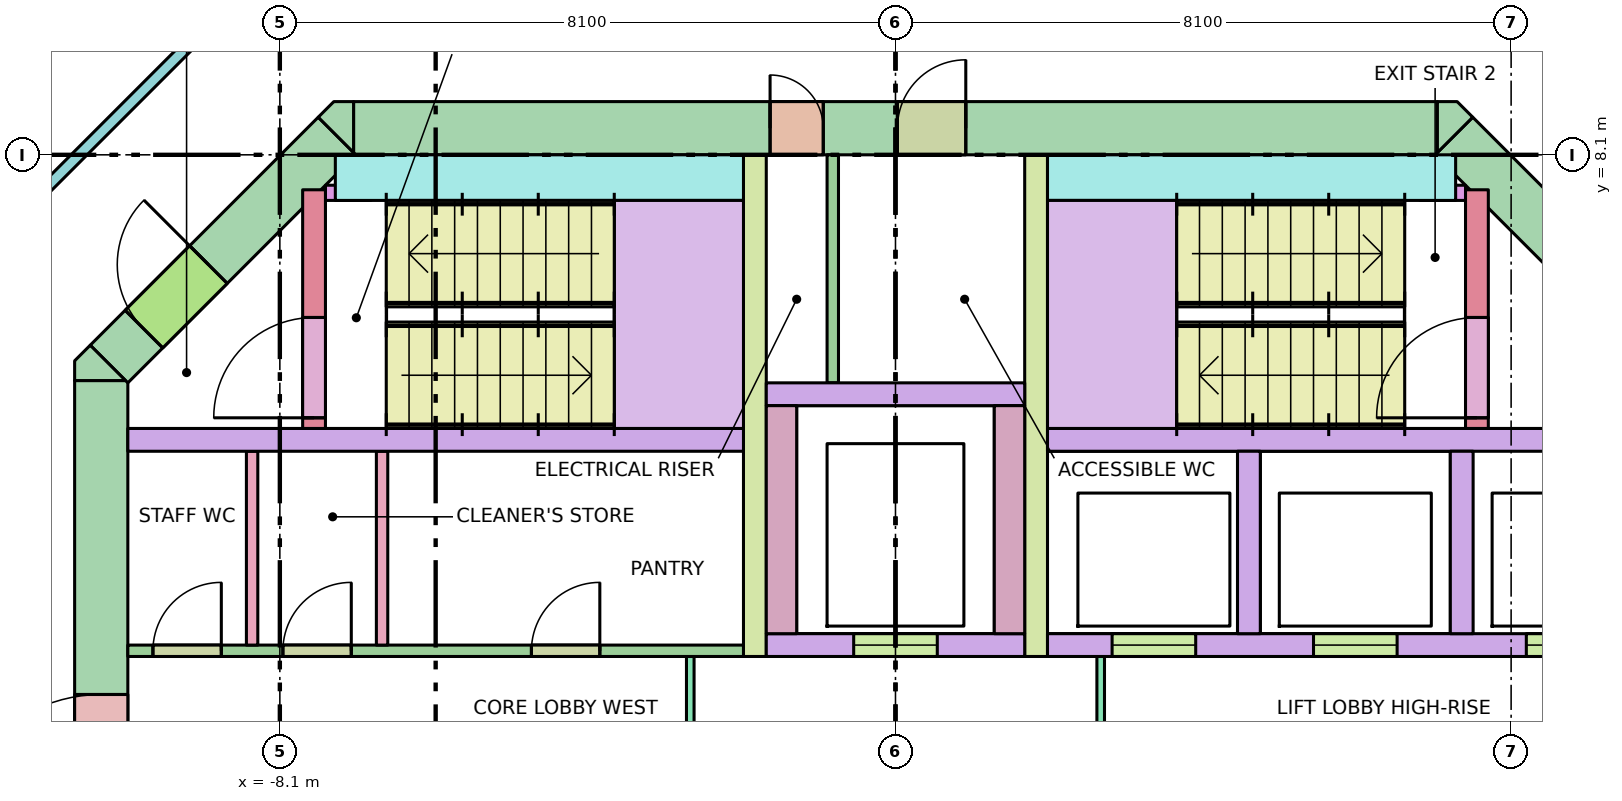
"""IFC4 building model, lengths in metres.
Left out: names, types, materials, properties, quantities, classifications, styles, units other than length and angle.
Written with IfcOpenShell. Run it as: python <this file> out.ifc"""

import sys

from ifc_helpers import new_model, si_unit, direction, frame, frame_2d, origin, place, context, subcontext, project, spatial, polyline, rectangle, outline, extrude, element, fill, save


model = new_model("IFC4")
c1 = context("Model", 3, precision=1e-05, world=origin(), true_north=direction((0.0, 1.0)))
c2 = subcontext(c1, "Body", "Model", "MODEL_VIEW")
j1 = project(units=[si_unit("LENGTHUNIT", "METRE"), si_unit("PLANEANGLEUNIT", "RADIAN")], contexts=[c1])
p1 = place(None, origin())
s1 = spatial("IfcSite", under=j1, at=p1, CompositionType="ELEMENT")
p2 = place(p1, origin())
s2 = spatial("IfcBuilding", under=s1, at=p2, CompositionType="ELEMENT")
p3 = place(p2, frame((0.0, 0.0, 165.3)))
s3 = spatial("IfcBuildingStorey", under=s2, at=p3, CompositionType="ELEMENT", Elevation=165.3)
p4 = place(p3, frame((-7.13, 8.45, -0.28), z_axis=(0.0, 0.0, 1.0), x_axis=(1.0, 0.0, 0.0)))
e1 = element("IfcWall", 1, at=p4, inside=s3, PredefinedType="SHEAR", context=c2, shape_type="SweptSolid", body=[
    extrude(rectangle(XDim=14.26, YDim=0.7, at=frame_2d((7.13, 0.0))), origin(), (0.0, 0.0, 1.0), 3.7),
])
p5 = place(p4, frame((5.48, 0.0, 0.28)))
e2 = element("IfcOpeningElement", 2, at=p5, cuts=e1, PredefinedType="OPENING", context=c2, shape_type="SweptSolid", body=[
    extrude(rectangle(XDim=0.7, YDim=2.1, at=frame_2d((0.35, 1.05))), frame((0.0, 0.36, 0.0), z_axis=(0.0, -1.0, 0.0), x_axis=(1.0, 0.0, 0.0)), (0.0, 0.0, 1.0), 0.72),
])
p6 = place(p4, frame((7.155, 0.0, 0.28)))
e3 = element("IfcOpeningElement", 3, at=p6, cuts=e1, PredefinedType="OPENING", context=c2, shape_type="SweptSolid", body=[
    extrude(rectangle(XDim=0.9, YDim=2.1, at=frame_2d((0.45, 1.05))), frame((0.0, 0.36, 0.0), z_axis=(0.0, -1.0, 0.0), x_axis=(1.0, 0.0, 0.0)), (0.0, 0.0, 1.0), 0.72),
])
p7 = place(p3, frame((-10.45, -5.13, -0.28), z_axis=(0.0, 0.0, 1.0), x_axis=(0.0, 1.0, 0.0)))
e4 = element("IfcWall", 4, at=p7, inside=s3, PredefinedType="SHEAR", context=c2, shape_type="SweptSolid", body=[
    extrude(rectangle(XDim=10.26, YDim=0.7, at=frame_2d((5.13, 0.0))), origin(), (0.0, 0.0, 1.0), 3.7),
])
p8 = place(p7, frame((4.13, 0.0, 0.28)))
e5 = element("IfcOpeningElement", 5, at=p8, cuts=e4, PredefinedType="OPENING", context=c2, shape_type="SweptSolid", body=[
    extrude(rectangle(XDim=2.0, YDim=2.1, at=frame_2d((1.0, 1.05))), frame((0.0, 0.36, 0.0), z_axis=(0.0, -1.0, 0.0), x_axis=(1.0, 0.0, 0.0)), (0.0, 0.0, 1.0), 0.72),
])
p9 = place(p3, frame((-10.347, 5.347, -0.28), z_axis=(0.0, 0.0, 1.0), x_axis=(0.707106781187, 0.707106781187, 0.0)))
e6 = element("IfcWall", 6, at=p9, inside=s3, PredefinedType="SHEAR", context=c2, shape_type="SweptSolid", body=[
    extrude(rectangle(XDim=4.243, YDim=0.7, at=frame_2d((2.121, 0.0))), origin(), (0.0, 0.0, 1.0), 3.7),
])
p10 = place(p9, frame((0.65, 0.0, 0.28)))
e7 = element("IfcOpeningElement", 7, at=p10, cuts=e6, PredefinedType="OPENING", context=c2, shape_type="SweptSolid", body=[
    extrude(rectangle(XDim=1.2, YDim=2.1, at=frame_2d((0.6, 1.05))), frame((0.0, 0.36, 0.0), z_axis=(0.0, -1.0, 0.0), x_axis=(1.0, 0.0, 0.0)), (0.0, 0.0, 1.0), 0.72),
])
p11 = place(p3, frame((7.347, 8.347, -0.28), z_axis=(0.0, 0.0, 1.0), x_axis=(0.707106781187, -0.707106781187, 0.0)))
e8 = element("IfcWall", 8, at=p11, inside=s3, PredefinedType="SHEAR", context=c2, shape_type="SweptSolid", body=[
    extrude(rectangle(XDim=4.243, YDim=0.7, at=frame_2d((2.121, 0.0))), origin(), (0.0, 0.0, 1.0), 3.7),
])
p12 = place(p11, frame((2.393, 0.0, 0.28)))
e9 = element("IfcOpeningElement", 9, at=p12, cuts=e8, PredefinedType="OPENING", context=c2, shape_type="SweptSolid", body=[
    extrude(rectangle(XDim=1.2, YDim=2.1, at=frame_2d((0.6, 1.05))), frame((0.0, 0.36, 0.0), z_axis=(0.0, -1.0, 0.0), x_axis=(1.0, 0.0, 0.0)), (0.0, 0.0, 1.0), 0.72),
])
p13 = place(p3, frame((0.0, 0.0, -0.28)))
e10 = element("IfcWall", 10, at=p13, inside=s3, PredefinedType="SHEAR", context=c2, shape_type="SweptSolid", body=[
    extrude(outline(polyline([(-10.595, 5.595), (-10.595, 5.595), (-10.595, 5.595), (-10.13, 5.13), (-10.8, 5.13), (-10.8, 5.13), (-10.8, 5.39), (-10.595, 5.595)])), origin(), (0.0, 0.0, 1.0), 3.7),
])
p14 = place(p3, frame((0.0, 0.0, -0.28)))
e11 = element("IfcWall", 11, at=p14, inside=s3, PredefinedType="SHEAR", context=c2, shape_type="SweptSolid", body=[
    extrude(outline(polyline([(-7.39, 8.8), (-7.13, 8.8), (-7.13, 8.8), (-7.13, 8.13), (-7.595, 8.595), (-7.595, 8.595), (-7.595, 8.595), (-7.39, 8.8)])), origin(), (0.0, 0.0, 1.0), 3.7),
])
p15 = place(p3, frame((0.0, 0.0, -0.28)))
e12 = element("IfcWall", 12, at=p15, inside=s3, PredefinedType="SHEAR", context=c2, shape_type="SweptSolid", body=[
    extrude(outline(polyline([(7.39, 8.8), (7.595, 8.595), (7.595, 8.595), (7.595, 8.595), (7.13, 8.13), (7.13, 8.8), (7.13, 8.8), (7.39, 8.8)])), origin(), (0.0, 0.0, 1.0), 3.7),
])
for number, where, z_axis, x_axis in (
    (13, (-10.1, 4.35, 0.0), (0.0, 0.0, 1.0), (1.0, 0.0, 0.0)),
    (14, (2.0, 4.35, 0.0), (0.0, 0.0, 1.0), (1.0, 0.0, 0.0)),
):
    element("IfcWall", number, at=place(p3, frame(where, z_axis=z_axis, x_axis=x_axis)), inside=s3, PredefinedType="SOLIDWALL", context=c2, shape_type="SweptSolid", body=[
        extrude(rectangle(XDim=8.1, YDim=0.3, at=frame_2d((4.05, 0.0))), origin(), (0.0, 0.0, 1.0), 3.42),
    ])
p16 = place(p3, frame((2.0, 1.65, 0.0), z_axis=(0.0, 0.0, 1.0), x_axis=(1.0, 0.0, 0.0)))
e15 = element("IfcWall", 15, at=p16, inside=s3, PredefinedType="SOLIDWALL", context=c2, shape_type="SweptSolid", body=[
    extrude(rectangle(XDim=8.1, YDim=0.3, at=frame_2d((4.05, 0.0))), origin(), (0.0, 0.0, 1.0), 3.42),
])
p17 = place(p16, frame((0.85, 0.0, 0.0)))
e16 = element("IfcOpeningElement", 16, at=p17, cuts=e15, PredefinedType="OPENING", context=c2, shape_type="SweptSolid", body=[
    extrude(rectangle(XDim=1.1, YDim=2.1, at=frame_2d((0.55, 1.05))), frame((0.0, 0.16, 0.0), z_axis=(0.0, -1.0, 0.0), x_axis=(1.0, 0.0, 0.0)), (0.0, 0.0, 1.0), 0.32),
])
p18 = place(p16, frame((3.5, 0.0, 0.0)))
e17 = element("IfcOpeningElement", 17, at=p18, cuts=e15, PredefinedType="OPENING", context=c2, shape_type="SweptSolid", body=[
    extrude(rectangle(XDim=1.1, YDim=2.1, at=frame_2d((0.55, 1.05))), frame((0.0, 0.16, 0.0), z_axis=(0.0, -1.0, 0.0), x_axis=(1.0, 0.0, 0.0)), (0.0, 0.0, 1.0), 0.32),
])
p19 = place(p16, frame((6.3, 0.0, 0.0)))
e18 = element("IfcOpeningElement", 18, at=p19, cuts=e15, PredefinedType="OPENING", context=c2, shape_type="SweptSolid", body=[
    extrude(rectangle(XDim=1.1, YDim=2.1, at=frame_2d((0.55, 1.05))), frame((0.0, 0.16, 0.0), z_axis=(0.0, -1.0, 0.0), x_axis=(1.0, 0.0, 0.0)), (0.0, 0.0, 1.0), 0.32),
])
for number, where, z_axis, x_axis in (
    (19, (4.65, 1.8, 0.0), (0.0, 0.0, 1.0), (0.0, 1.0, 0.0)),
    (20, (7.45, 1.8, 0.0), (0.0, 0.0, 1.0), (0.0, 1.0, 0.0)),
):
    element("IfcWall", number, at=place(p3, frame(where, z_axis=z_axis, x_axis=x_axis)), inside=s3, PredefinedType="SOLIDWALL", context=c2, shape_type="SweptSolid", body=[
        extrude(rectangle(XDim=2.4, YDim=0.3, at=frame_2d((1.2, 0.0))), origin(), (0.0, 0.0, 1.0), 3.42),
    ])
for number, where, z_axis, x_axis in (
    (21, (-1.85, 1.5, 0.0), (0.0, 0.0, 1.0), (0.0, 1.0, 0.0)),
    (22, (1.85, 1.5, 0.0), (0.0, 0.0, 1.0), (0.0, 1.0, 0.0)),
):
    element("IfcWall", number, at=place(p3, frame(where, z_axis=z_axis, x_axis=x_axis)), inside=s3, PredefinedType="SHEAR", context=c2, shape_type="SweptSolid", body=[
        extrude(rectangle(XDim=6.6, YDim=0.3, at=frame_2d((3.3, 0.0))), origin(), (0.0, 0.0, 1.0), 3.42),
    ])
p20 = place(p3, frame((-1.7, 1.65, 0.0), z_axis=(0.0, 0.0, 1.0), x_axis=(1.0, 0.0, 0.0)))
e23 = element("IfcWall", 23, at=p20, inside=s3, PredefinedType="SOLIDWALL", context=c2, shape_type="SweptSolid", body=[
    extrude(rectangle(XDim=3.4, YDim=0.3, at=frame_2d((1.7, 0.0))), origin(), (0.0, 0.0, 1.0), 3.42),
])
p21 = place(p20, frame((1.15, 0.0, 0.0)))
e24 = element("IfcOpeningElement", 24, at=p21, cuts=e23, PredefinedType="OPENING", context=c2, shape_type="SweptSolid", body=[
    extrude(rectangle(XDim=1.1, YDim=2.1, at=frame_2d((0.55, 1.05))), frame((0.0, 0.16, 0.0), z_axis=(0.0, -1.0, 0.0), x_axis=(1.0, 0.0, 0.0)), (0.0, 0.0, 1.0), 0.32),
])
for number, where, z_axis, x_axis in (
    (25, (-1.5, 1.8, 0.0), (0.0, 0.0, 1.0), (0.0, 1.0, 0.0)),
    (26, (1.5, 1.8, 0.0), (0.0, 0.0, 1.0), (0.0, 1.0, 0.0)),
):
    element("IfcWall", number, at=place(p3, frame(where, z_axis=z_axis, x_axis=x_axis)), inside=s3, PredefinedType="SOLIDWALL", context=c2, shape_type="SweptSolid", body=[
        extrude(rectangle(XDim=3.0, YDim=0.4, at=frame_2d((1.5, 0.0))), origin(), (0.0, 0.0, 1.0), 3.42),
    ])
p22 = place(p3, frame((-1.7, 4.95, 0.0), z_axis=(0.0, 0.0, 1.0), x_axis=(1.0, 0.0, 0.0)))
e27 = element("IfcWall", 27, at=p22, inside=s3, PredefinedType="SOLIDWALL", context=c2, shape_type="SweptSolid", body=[
    extrude(rectangle(XDim=3.4, YDim=0.3, at=frame_2d((1.7, 0.0))), origin(), (0.0, 0.0, 1.0), 3.42),
])
p23 = place(p3, frame((-7.65, 4.5, 0.0), z_axis=(0.0, 0.0, 1.0), x_axis=(0.0, 1.0, 0.0)))
e28 = element("IfcWall", 28, at=p23, inside=s3, PredefinedType="SHEAR", context=c2, shape_type="SweptSolid", body=[
    extrude(rectangle(XDim=3.14, YDim=0.3, at=frame_2d((1.57, 0.0))), origin(), (0.0, 0.0, 1.0), 3.42),
])
p24 = place(p23, frame((0.14, 0.0, 0.0)))
e29 = element("IfcOpeningElement", 29, at=p24, cuts=e28, PredefinedType="OPENING", context=c2, shape_type="SweptSolid", body=[
    extrude(rectangle(XDim=1.32, YDim=2.1, at=frame_2d((0.66, 1.05))), frame((0.0, 0.16, 0.0), z_axis=(0.0, -1.0, 0.0), x_axis=(1.0, 0.0, 0.0)), (0.0, 0.0, 1.0), 0.32),
])
p25 = place(p3, frame((-7.37, 7.8, 0.0), z_axis=(0.0, 0.0, 1.0), x_axis=(1.0, 0.0, 0.0)))
e30 = element("IfcWall", 30, at=p25, inside=s3, PredefinedType="SHEAR", context=c2, shape_type="SweptSolid", body=[
    extrude(rectangle(XDim=5.37, YDim=0.6, at=frame_2d((2.685, 0.0))), origin(), (0.0, 0.0, 1.0), 3.42),
])
p26 = place(p3, frame((7.65, 4.5, 0.0), z_axis=(0.0, 0.0, 1.0), x_axis=(0.0, 1.0, 0.0)))
e31 = element("IfcWall", 31, at=p26, inside=s3, PredefinedType="SHEAR", context=c2, shape_type="SweptSolid", body=[
    extrude(rectangle(XDim=3.14, YDim=0.3, at=frame_2d((1.57, 0.0))), origin(), (0.0, 0.0, 1.0), 3.42),
])
p27 = place(p26, frame((0.14, 0.0, 0.0)))
e32 = element("IfcOpeningElement", 32, at=p27, cuts=e31, PredefinedType="OPENING", context=c2, shape_type="SweptSolid", body=[
    extrude(rectangle(XDim=1.32, YDim=2.1, at=frame_2d((0.66, 1.05))), frame((0.0, 0.16, 0.0), z_axis=(0.0, -1.0, 0.0), x_axis=(1.0, 0.0, 0.0)), (0.0, 0.0, 1.0), 0.32),
])
p28 = place(p3, frame((2.0, 7.8, 0.0), z_axis=(0.0, 0.0, 1.0), x_axis=(1.0, 0.0, 0.0)))
e33 = element("IfcWall", 33, at=p28, inside=s3, PredefinedType="SHEAR", context=c2, shape_type="SweptSolid", body=[
    extrude(rectangle(XDim=5.37, YDim=0.6, at=frame_2d((2.685, 0.0))), origin(), (0.0, 0.0, 1.0), 3.42),
])
for number, where, z_axis, x_axis in (
    (34, (-7.5, 7.6, 0.0), (0.0, 0.0, 1.0), (1.0, 0.0, 0.0)),
    (35, (6.9, 7.6, 0.0), (0.0, 0.0, 1.0), (1.0, 0.0, 0.0)),
):
    element("IfcWall", number, at=place(p3, frame(where, z_axis=z_axis, x_axis=x_axis)), inside=s3, PredefinedType="SHEAR", context=c2, shape_type="SweptSolid", body=[
        extrude(rectangle(XDim=0.6, YDim=0.2, at=frame_2d((0.3, 0.0))), origin(), (0.0, 0.0, 1.0), 3.42),
    ])
p29 = place(p3, frame((-2.7, -1.5, 0.0), z_axis=(0.0, 0.0, 1.0), x_axis=(0.0, 1.0, 0.0)))
e36 = element("IfcWall", 36, at=p29, inside=s3, PredefinedType="PARTITIONING", context=c2, shape_type="SweptSolid", body=[
    extrude(rectangle(XDim=3.0, YDim=0.1, at=frame_2d((1.5, 0.0))), origin(), (0.0, 0.0, 1.0), 3.42),
])
p30 = place(p29, frame((0.9, 0.0, 0.0)))
e37 = element("IfcOpeningElement", 37, at=p30, cuts=e36, PredefinedType="OPENING", context=c2, shape_type="SweptSolid", body=[
    extrude(rectangle(XDim=1.2, YDim=2.1, at=frame_2d((0.6, 1.05))), frame((0.0, 0.06, 0.0), z_axis=(0.0, -1.0, 0.0), x_axis=(1.0, 0.0, 0.0)), (0.0, 0.0, 1.0), 0.12),
])
p31 = place(p3, frame((2.7, -1.5, 0.0), z_axis=(0.0, 0.0, 1.0), x_axis=(0.0, 1.0, 0.0)))
e38 = element("IfcWall", 38, at=p31, inside=s3, PredefinedType="PARTITIONING", context=c2, shape_type="SweptSolid", body=[
    extrude(rectangle(XDim=3.0, YDim=0.1, at=frame_2d((1.5, 0.0))), origin(), (0.0, 0.0, 1.0), 3.42),
])
p32 = place(p31, frame((0.9, 0.0, 0.0)))
e39 = element("IfcOpeningElement", 39, at=p32, cuts=e38, PredefinedType="OPENING", context=c2, shape_type="SweptSolid", body=[
    extrude(rectangle(XDim=1.2, YDim=2.1, at=frame_2d((0.6, 1.05))), frame((0.0, 0.06, 0.0), z_axis=(0.0, -1.0, 0.0), x_axis=(1.0, 0.0, 0.0)), (0.0, 0.0, 1.0), 0.12),
])
p33 = place(p3, frame((-0.825, 5.1, 0.0), z_axis=(0.0, 0.0, 1.0), x_axis=(0.0, 1.0, 0.0)))
e40 = element("IfcWall", 40, at=p33, inside=s3, PredefinedType="PARTITIONING", context=c2, shape_type="SweptSolid", body=[
    extrude(rectangle(XDim=3.0, YDim=0.15, at=frame_2d((1.5, 0.0))), origin(), (0.0, 0.0, 1.0), 3.42),
])
for number, where, z_axis, x_axis in (
    (41, (-8.465, 1.65, 0.0), (0.0, 0.0, 1.0), (0.0, 1.0, 0.0)),
    (42, (-6.755, 1.65, 0.0), (0.0, 0.0, 1.0), (0.0, 1.0, 0.0)),
):
    element("IfcWall", number, at=place(p3, frame(where, z_axis=z_axis, x_axis=x_axis)), inside=s3, PredefinedType="PARTITIONING", context=c2, shape_type="SweptSolid", body=[
        extrude(rectangle(XDim=2.55, YDim=0.15, at=frame_2d((1.275, 0.0))), origin(), (0.0, 0.0, 1.0), 3.42),
    ])
p34 = place(p3, frame((-10.1, 1.575, 0.0), z_axis=(0.0, 0.0, 1.0), x_axis=(1.0, 0.0, 0.0)))
e43 = element("IfcWall", 43, at=p34, inside=s3, PredefinedType="PARTITIONING", context=c2, shape_type="SweptSolid", body=[
    extrude(rectangle(XDim=8.1, YDim=0.15, at=frame_2d((4.05, 0.0))), origin(), (0.0, 0.0, 1.0), 3.42),
])
p35 = place(p34, frame((0.33, 0.0, 0.0)))
e44 = element("IfcOpeningElement", 44, at=p35, cuts=e43, PredefinedType="OPENING", context=c2, shape_type="SweptSolid", body=[
    extrude(rectangle(XDim=0.9, YDim=2.1, at=frame_2d((0.45, 1.05))), frame((0.0, 0.085, 0.0), z_axis=(0.0, -1.0, 0.0), x_axis=(1.0, 0.0, 0.0)), (0.0, 0.0, 1.0), 0.17),
])
p36 = place(p34, frame((2.04, 0.0, 0.0)))
e45 = element("IfcOpeningElement", 45, at=p36, cuts=e43, PredefinedType="OPENING", context=c2, shape_type="SweptSolid", body=[
    extrude(rectangle(XDim=0.9, YDim=2.1, at=frame_2d((0.45, 1.05))), frame((0.0, 0.085, 0.0), z_axis=(0.0, -1.0, 0.0), x_axis=(1.0, 0.0, 0.0)), (0.0, 0.0, 1.0), 0.17),
])
p37 = place(p34, frame((5.31, 0.0, 0.0)))
e46 = element("IfcOpeningElement", 46, at=p37, cuts=e43, PredefinedType="OPENING", context=c2, shape_type="SweptSolid", body=[
    extrude(rectangle(XDim=0.9, YDim=2.1, at=frame_2d((0.45, 1.05))), frame((0.0, 0.085, 0.0), z_axis=(0.0, -1.0, 0.0), x_axis=(1.0, 0.0, 0.0)), (0.0, 0.0, 1.0), 0.17),
])
p38 = place(p3, frame((-12.638, 6.204, 0.0), z_axis=(0.0, 0.0, 1.0), x_axis=(0.707106781187, 0.707106781187, 0.0)))
e47 = element("IfcWall", 47, at=p38, inside=s3, PredefinedType="PARTITIONING", context=c2, shape_type="SweptSolid", body=[
    extrude(rectangle(XDim=6.271, YDim=0.15, at=frame_2d((3.135, 0.0))), origin(), (0.0, 0.0, 1.0), 2.62),
])
p39 = place(p3, frame((8.204, 10.638, 0.0), z_axis=(0.0, 0.0, 1.0), x_axis=(0.707177693966, -0.707035861295, 0.0)))
e48 = element("IfcWall", 48, at=p39, inside=s3, PredefinedType="PARTITIONING", context=c2, shape_type="SweptSolid", body=[
    extrude(rectangle(XDim=1.721, YDim=0.15, at=frame_2d((0.861, 0.0))), origin(), (0.0, 0.0, 1.0), 2.62),
])
p40 = place(p39, frame((0.411, 0.0, 0.0)))
e49 = element("IfcOpeningElement", 49, at=p40, cuts=e48, PredefinedType="OPENING", context=c2, shape_type="SweptSolid", body=[
    extrude(rectangle(XDim=0.9, YDim=2.1, at=frame_2d((0.45, 1.05))), frame((0.0, 0.085, 0.0), z_axis=(0.0, -1.0, 0.0), x_axis=(1.0, 0.0, 0.0)), (0.0, 0.0, 1.0), 0.17),
])
p41 = place(p17, origin())
e50 = element("IfcDoor", 50, at=p41, inside=s3, OperationType="DOUBLE_DOOR_SLIDING", PredefinedType="DOOR", context=c2, shape_type="SweptSolid", body=[
    extrude(rectangle(XDim=1.1, YDim=2.1, at=frame_2d((0.55, 1.05))), frame((0.0, 0.025, 0.0), z_axis=(0.0, -1.0, 0.0), x_axis=(1.0, 0.0, 0.0)), (0.0, 0.0, 1.0), 0.05),
])
fill(e16, e50)
p42 = place(p18, origin())
e51 = element("IfcDoor", 51, at=p42, inside=s3, OperationType="DOUBLE_DOOR_SLIDING", PredefinedType="DOOR", context=c2, shape_type="SweptSolid", body=[
    extrude(rectangle(XDim=1.1, YDim=2.1, at=frame_2d((0.55, 1.05))), frame((0.0, 0.025, 0.0), z_axis=(0.0, -1.0, 0.0), x_axis=(1.0, 0.0, 0.0)), (0.0, 0.0, 1.0), 0.05),
])
fill(e17, e51)
p43 = place(p19, origin())
e52 = element("IfcDoor", 52, at=p43, inside=s3, OperationType="DOUBLE_DOOR_SLIDING", PredefinedType="DOOR", context=c2, shape_type="SweptSolid", body=[
    extrude(rectangle(XDim=1.1, YDim=2.1, at=frame_2d((0.55, 1.05))), frame((0.0, 0.025, 0.0), z_axis=(0.0, -1.0, 0.0), x_axis=(1.0, 0.0, 0.0)), (0.0, 0.0, 1.0), 0.05),
])
fill(e18, e52)
p44 = place(p21, origin())
e53 = element("IfcDoor", 53, at=p44, inside=s3, OperationType="DOUBLE_DOOR_SLIDING", PredefinedType="DOOR", context=c2, shape_type="SweptSolid", body=[
    extrude(rectangle(XDim=1.1, YDim=2.1, at=frame_2d((0.55, 1.05))), frame((0.0, 0.025, 0.0), z_axis=(0.0, -1.0, 0.0), x_axis=(1.0, 0.0, 0.0)), (0.0, 0.0, 1.0), 0.05),
])
fill(e24, e53)
p45 = place(p24, origin())
e54 = element("IfcDoor", 54, at=p45, inside=s3, OperationType="DOUBLE_DOOR_SINGLE_SWING", PredefinedType="DOOR", context=c2, shape_type="SweptSolid", body=[
    extrude(rectangle(XDim=1.32, YDim=2.1, at=frame_2d((0.66, 1.05))), frame((0.0, 0.025, 0.0), z_axis=(0.0, -1.0, 0.0), x_axis=(1.0, 0.0, 0.0)), (0.0, 0.0, 1.0), 0.05),
])
fill(e29, e54)
p46 = place(p10, origin())
e55 = element("IfcDoor", 55, at=p46, inside=s3, OperationType="SINGLE_SWING_RIGHT", PredefinedType="DOOR", context=c2, shape_type="SweptSolid", body=[
    extrude(rectangle(XDim=1.2, YDim=2.1, at=frame_2d((0.6, 1.05))), frame((0.0, 0.025, 0.0), z_axis=(0.0, -1.0, 0.0), x_axis=(1.0, 0.0, 0.0)), (0.0, 0.0, 1.0), 0.05),
])
fill(e7, e55)
p47 = place(p27, origin())
e56 = element("IfcDoor", 56, at=p47, inside=s3, OperationType="DOUBLE_DOOR_SINGLE_SWING", PredefinedType="DOOR", context=c2, shape_type="SweptSolid", body=[
    extrude(rectangle(XDim=1.32, YDim=2.1, at=frame_2d((0.66, 1.05))), frame((0.0, 0.025, 0.0), z_axis=(0.0, -1.0, 0.0), x_axis=(1.0, 0.0, 0.0)), (0.0, 0.0, 1.0), 0.05),
])
fill(e32, e56)
p48 = place(p8, origin())
e57 = element("IfcDoor", 57, at=p48, inside=s3, OperationType="DOUBLE_DOOR_SINGLE_SWING", PredefinedType="DOOR", context=c2, shape_type="SweptSolid", body=[
    extrude(rectangle(XDim=2.0, YDim=2.1, at=frame_2d((1.0, 1.05))), frame((0.0, 0.025, 0.0), z_axis=(0.0, -1.0, 0.0), x_axis=(1.0, 0.0, 0.0)), (0.0, 0.0, 1.0), 0.05),
])
fill(e5, e57)
p49 = place(p5, origin())
e58 = element("IfcDoor", 58, at=p49, inside=s3, OperationType="SINGLE_SWING_LEFT", PredefinedType="DOOR", context=c2, shape_type="SweptSolid", body=[
    extrude(rectangle(XDim=0.7, YDim=2.1, at=frame_2d((0.35, 1.05))), frame((0.0, 0.025, 0.0), z_axis=(0.0, -1.0, 0.0), x_axis=(1.0, 0.0, 0.0)), (0.0, 0.0, 1.0), 0.05),
])
fill(e2, e58)
p50 = place(p6, origin())
e59 = element("IfcDoor", 59, at=p50, inside=s3, OperationType="SINGLE_SWING_RIGHT", PredefinedType="DOOR", context=c2, shape_type="SweptSolid", body=[
    extrude(rectangle(XDim=0.9, YDim=2.1, at=frame_2d((0.45, 1.05))), frame((0.0, 0.025, 0.0), z_axis=(0.0, -1.0, 0.0), x_axis=(1.0, 0.0, 0.0)), (0.0, 0.0, 1.0), 0.05),
])
fill(e3, e59)
p51 = place(p35, origin())
e60 = element("IfcDoor", 60, at=p51, inside=s3, OperationType="SINGLE_SWING_RIGHT", PredefinedType="DOOR", context=c2, shape_type="SweptSolid", body=[
    extrude(rectangle(XDim=0.9, YDim=2.1, at=frame_2d((0.45, 1.05))), frame((0.0, 0.025, 0.0), z_axis=(0.0, -1.0, 0.0), x_axis=(1.0, 0.0, 0.0)), (0.0, 0.0, 1.0), 0.05),
])
fill(e44, e60)
p52 = place(p36, origin())
e61 = element("IfcDoor", 61, at=p52, inside=s3, OperationType="SINGLE_SWING_RIGHT", PredefinedType="DOOR", context=c2, shape_type="SweptSolid", body=[
    extrude(rectangle(XDim=0.9, YDim=2.1, at=frame_2d((0.45, 1.05))), frame((0.0, 0.025, 0.0), z_axis=(0.0, -1.0, 0.0), x_axis=(1.0, 0.0, 0.0)), (0.0, 0.0, 1.0), 0.05),
])
fill(e45, e61)
p53 = place(p37, origin())
e62 = element("IfcDoor", 62, at=p53, inside=s3, OperationType="SINGLE_SWING_RIGHT", PredefinedType="DOOR", context=c2, shape_type="SweptSolid", body=[
    extrude(rectangle(XDim=0.9, YDim=2.1, at=frame_2d((0.45, 1.05))), frame((0.0, 0.025, 0.0), z_axis=(0.0, -1.0, 0.0), x_axis=(1.0, 0.0, 0.0)), (0.0, 0.0, 1.0), 0.05),
])
fill(e46, e62)
save(model, sys.argv[1])
